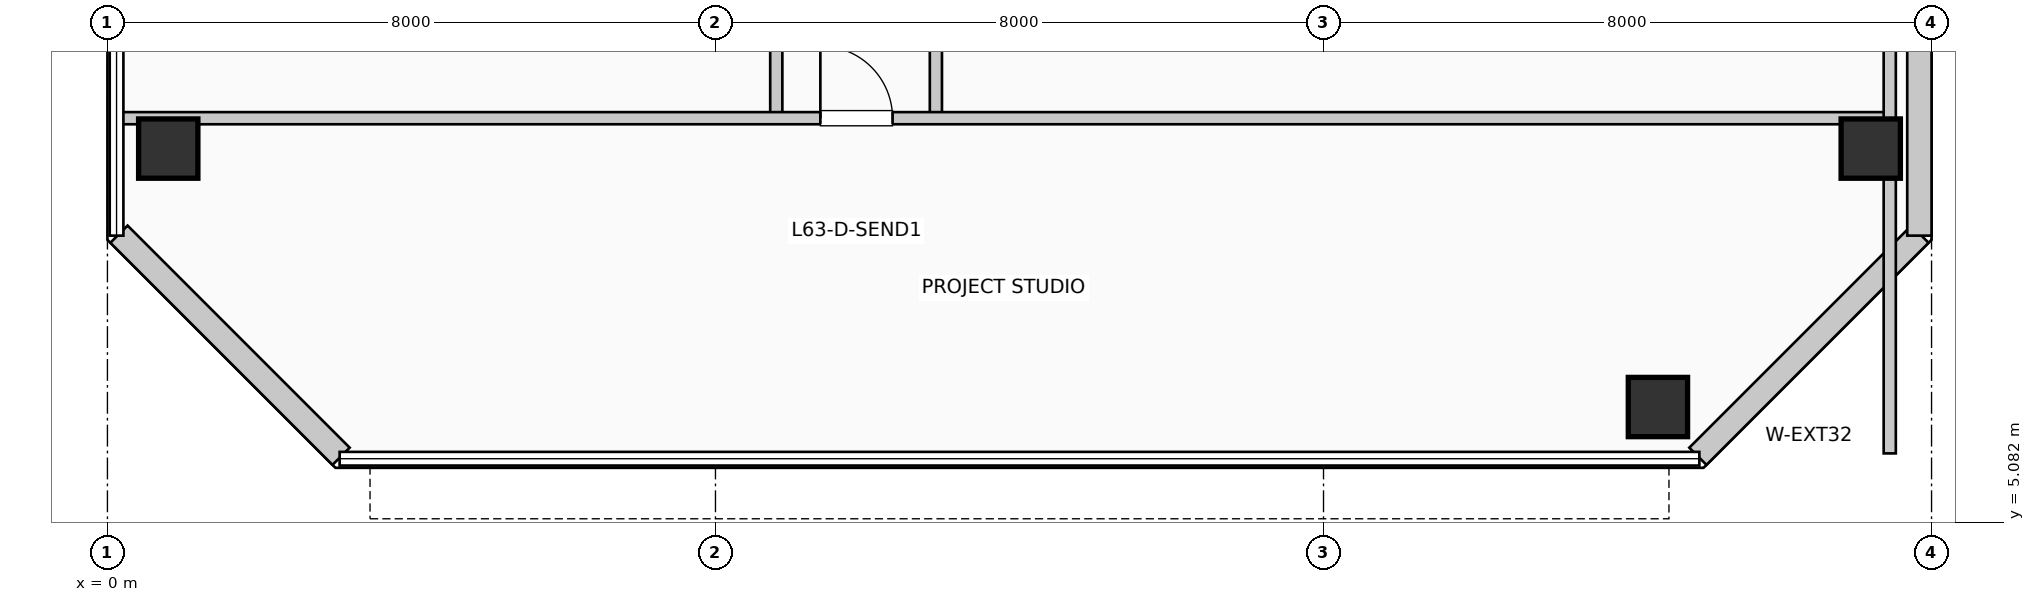
"""IFC4 building model, lengths in metres.
Left out: names, types, materials, properties, quantities, classifications, styles, units other than length and angle.
Written with IfcOpenShell. Run it as: python <this file> out.ifc"""

import sys

from ifc_helpers import new_model, si_unit, direction, frame, frame_2d, origin, origin_2d, place, context, subcontext, project, spatial, rectangle, extrude, element, fill, save


model = new_model("IFC4")
c1 = context("Model", 3, precision=1e-05, world=origin(), true_north=direction((0.0, 1.0)))
c2 = subcontext(c1, "Body", "Model", "MODEL_VIEW")
j1 = project(units=[si_unit("LENGTHUNIT", "METRE"), si_unit("PLANEANGLEUNIT", "RADIAN")], contexts=[c1])
p1 = place(None, origin())
s1 = spatial("IfcSite", under=j1, at=p1, CompositionType="ELEMENT")
p2 = place(p1, origin())
s2 = spatial("IfcBuilding", under=s1, at=p2, CompositionType="ELEMENT")
p3 = place(p2, frame((0.0, 0.0, 260.37)))
s3 = spatial("IfcBuildingStorey", under=s2, at=p3, CompositionType="ELEMENT", Elevation=260.37)
for number, where, z_axis, x_axis in (
    (1, (0.8, 10.0, 0.0), (0.0, 0.0, 1.0), (1.0, 0.0, 0.0)),
    (2, (20.4, 6.6, 0.0), (0.0, 0.0, 1.0), (1.0, 0.0, 0.0)),
    (3, (23.2, 10.0, 0.0), (0.0, 0.0, 1.0), (1.0, 0.0, 0.0)),
):
    element("IfcColumn", number, at=place(p3, frame(where, z_axis=z_axis, x_axis=x_axis)), inside=s3, PredefinedType="COLUMN", context=c2, shape_type="SweptSolid", body=[
        extrude(rectangle(XDim=0.78, YDim=0.78, at=origin_2d()), origin(), (0.0, 0.0, 1.0), 3.96),
    ])
p4 = place(p3, frame((20.926, 5.952, 0.0), z_axis=(0.0, 0.0, 1.0), x_axis=(0.707077242712, 0.707136318428, 0.0)))
e4 = element("IfcWall", 4, at=p4, inside=s3, PredefinedType="SOLIDWALL", context=c2, shape_type="SweptSolid", body=[
    extrude(rectangle(XDim=4.133, YDim=0.32, at=frame_2d((2.066, 0.0))), origin(), (0.0, 0.0, 1.0), 3.71),
])
p5 = place(p3, frame((23.84, 8.855, 0.0), z_axis=(0.0, 0.0, 1.0), x_axis=(0.0, 1.0, 0.0)))
e5 = element("IfcWall", 5, at=p5, inside=s3, PredefinedType="SOLIDWALL", context=c2, shape_type="SweptSolid", body=[
    extrude(rectangle(XDim=11.09, YDim=0.32, at=frame_2d((5.545, 0.0))), origin(), (0.0, 0.0, 1.0), 3.71),
])
p6 = place(p3, frame((0.152, 8.874, 0.0), z_axis=(0.0, 0.0, 1.0), x_axis=(0.707077242712, -0.707136318428, 0.0)))
e6 = element("IfcWall", 6, at=p6, inside=s3, PredefinedType="SOLIDWALL", context=c2, shape_type="SweptSolid", body=[
    extrude(rectangle(XDim=4.133, YDim=0.32, at=frame_2d((2.066, 0.0))), origin(), (0.0, 0.0, 1.0), 3.71),
])
p7 = place(p3, frame((8.8, 10.4, 0.0), z_axis=(0.0, 0.0, 1.0), x_axis=(0.0, 1.0, 0.0)))
e7 = element("IfcWall", 7, at=p7, inside=s3, PredefinedType="PARTITIONING", context=c2, shape_type="SweptSolid", body=[
    extrude(rectangle(XDim=19.0, YDim=0.16, at=frame_2d((9.5, 0.0))), origin(), (0.0, 0.0, 1.0), 3.71),
])
p8 = place(p7, frame((4.275, 0.0, 0.0), z_axis=(0.0, 0.0, 1.0), x_axis=(-1.0, 0.0, 0.0)))
e8 = element("IfcOpeningElement", 8, at=p8, cuts=e7, PredefinedType="OPENING", context=c2, shape_type="SweptSolid", body=[
    extrude(rectangle(XDim=0.95, YDim=2.15, at=frame_2d((0.475, 1.075))), frame((0.0, 0.09, 0.0), z_axis=(0.0, -1.0, 0.0), x_axis=(1.0, 0.0, 0.0)), (0.0, 0.0, 1.0), 0.18),
])
p9 = place(p7, frame((11.305, 0.0, 0.0), z_axis=(0.0, 0.0, 1.0), x_axis=(-1.0, 0.0, 0.0)))
e9 = element("IfcOpeningElement", 9, at=p9, cuts=e7, PredefinedType="OPENING", context=c2, shape_type="SweptSolid", body=[
    extrude(rectangle(XDim=0.95, YDim=2.15, at=frame_2d((0.475, 1.075))), frame((0.0, 0.09, 0.0), z_axis=(0.0, -1.0, 0.0), x_axis=(1.0, 0.0, 0.0)), (0.0, 0.0, 1.0), 0.18),
])
p10 = place(p7, frame((17.005, 0.0, 0.0), z_axis=(0.0, 0.0, 1.0), x_axis=(-1.0, 0.0, 0.0)))
e10 = element("IfcOpeningElement", 10, at=p10, cuts=e7, PredefinedType="OPENING", context=c2, shape_type="SweptSolid", body=[
    extrude(rectangle(XDim=0.95, YDim=2.15, at=frame_2d((0.475, 1.075))), frame((0.0, 0.09, 0.0), z_axis=(0.0, -1.0, 0.0), x_axis=(1.0, 0.0, 0.0)), (0.0, 0.0, 1.0), 0.18),
])
p11 = place(p3, frame((10.9, 10.4, 0.0), z_axis=(0.0, 0.0, 1.0), x_axis=(0.0, 1.0, 0.0)))
e11 = element("IfcWall", 11, at=p11, inside=s3, PredefinedType="PARTITIONING", context=c2, shape_type="SweptSolid", body=[
    extrude(rectangle(XDim=19.0, YDim=0.16, at=frame_2d((9.5, 0.0))), origin(), (0.0, 0.0, 1.0), 3.71),
])
p12 = place(p11, frame((2.995, 0.0, 0.0)))
e12 = element("IfcOpeningElement", 12, at=p12, cuts=e11, PredefinedType="OPENING", context=c2, shape_type="SweptSolid", body=[
    extrude(rectangle(XDim=0.95, YDim=2.15, at=frame_2d((0.475, 1.075))), frame((0.0, 0.09, 0.0), z_axis=(0.0, -1.0, 0.0), x_axis=(1.0, 0.0, 0.0)), (0.0, 0.0, 1.0), 0.18),
])
p13 = place(p11, frame((6.505, 0.0, 0.0)))
e13 = element("IfcOpeningElement", 13, at=p13, cuts=e11, PredefinedType="OPENING", context=c2, shape_type="SweptSolid", body=[
    extrude(rectangle(XDim=0.95, YDim=2.15, at=frame_2d((0.475, 1.075))), frame((0.0, 0.09, 0.0), z_axis=(0.0, -1.0, 0.0), x_axis=(1.0, 0.0, 0.0)), (0.0, 0.0, 1.0), 0.18),
])
p14 = place(p11, frame((14.535, 0.0, 0.0)))
e14 = element("IfcOpeningElement", 14, at=p14, cuts=e11, PredefinedType="OPENING", context=c2, shape_type="SweptSolid", body=[
    extrude(rectangle(XDim=0.95, YDim=2.15, at=frame_2d((0.475, 1.075))), frame((0.0, 0.09, 0.0), z_axis=(0.0, -1.0, 0.0), x_axis=(1.0, 0.0, 0.0)), (0.0, 0.0, 1.0), 0.18),
])
p15 = place(p3, frame((0.19, 10.4, 0.0), z_axis=(0.0, 0.0, 1.0), x_axis=(1.0, 0.0, 0.0)))
e15 = element("IfcWall", 15, at=p15, inside=s3, PredefinedType="PARTITIONING", context=c2, shape_type="SweptSolid", body=[
    extrude(rectangle(XDim=23.26, YDim=0.16, at=frame_2d((11.63, 0.0))), origin(), (0.0, 0.0, 1.0), 3.095),
])
p16 = place(p15, frame((9.19, 0.0, 0.0)))
e16 = element("IfcOpeningElement", 16, at=p16, cuts=e15, PredefinedType="OPENING", context=c2, shape_type="SweptSolid", body=[
    extrude(rectangle(XDim=0.95, YDim=2.15, at=frame_2d((0.475, 1.075))), frame((0.0, 0.09, 0.0), z_axis=(0.0, -1.0, 0.0), x_axis=(1.0, 0.0, 0.0)), (0.0, 0.0, 1.0), 0.18),
])
p17 = place(p3, frame((23.45, 5.99, 0.0), z_axis=(0.0, 0.0, 1.0), x_axis=(0.0, 1.0, 0.0)))
e17 = element("IfcWall", 17, at=p17, inside=s3, PredefinedType="PARTITIONING", context=c2, shape_type="SweptSolid", body=[
    extrude(rectangle(XDim=23.41, YDim=0.16, at=frame_2d((11.705, 0.0))), origin(), (0.0, 0.0, 1.0), 3.095),
])
p18 = place(p16, origin())
e18 = element("IfcDoor", 18, at=p18, inside=s3, OperationType="SINGLE_SWING_LEFT", PredefinedType="DOOR", context=c2, shape_type="SweptSolid", body=[
    extrude(rectangle(XDim=0.95, YDim=2.15, at=frame_2d((0.475, 1.075))), frame((0.0, 0.025, 0.0), z_axis=(0.0, -1.0, 0.0), x_axis=(1.0, 0.0, 0.0)), (0.0, 0.0, 1.0), 0.05),
])
fill(e16, e18)
save(model, sys.argv[1])
